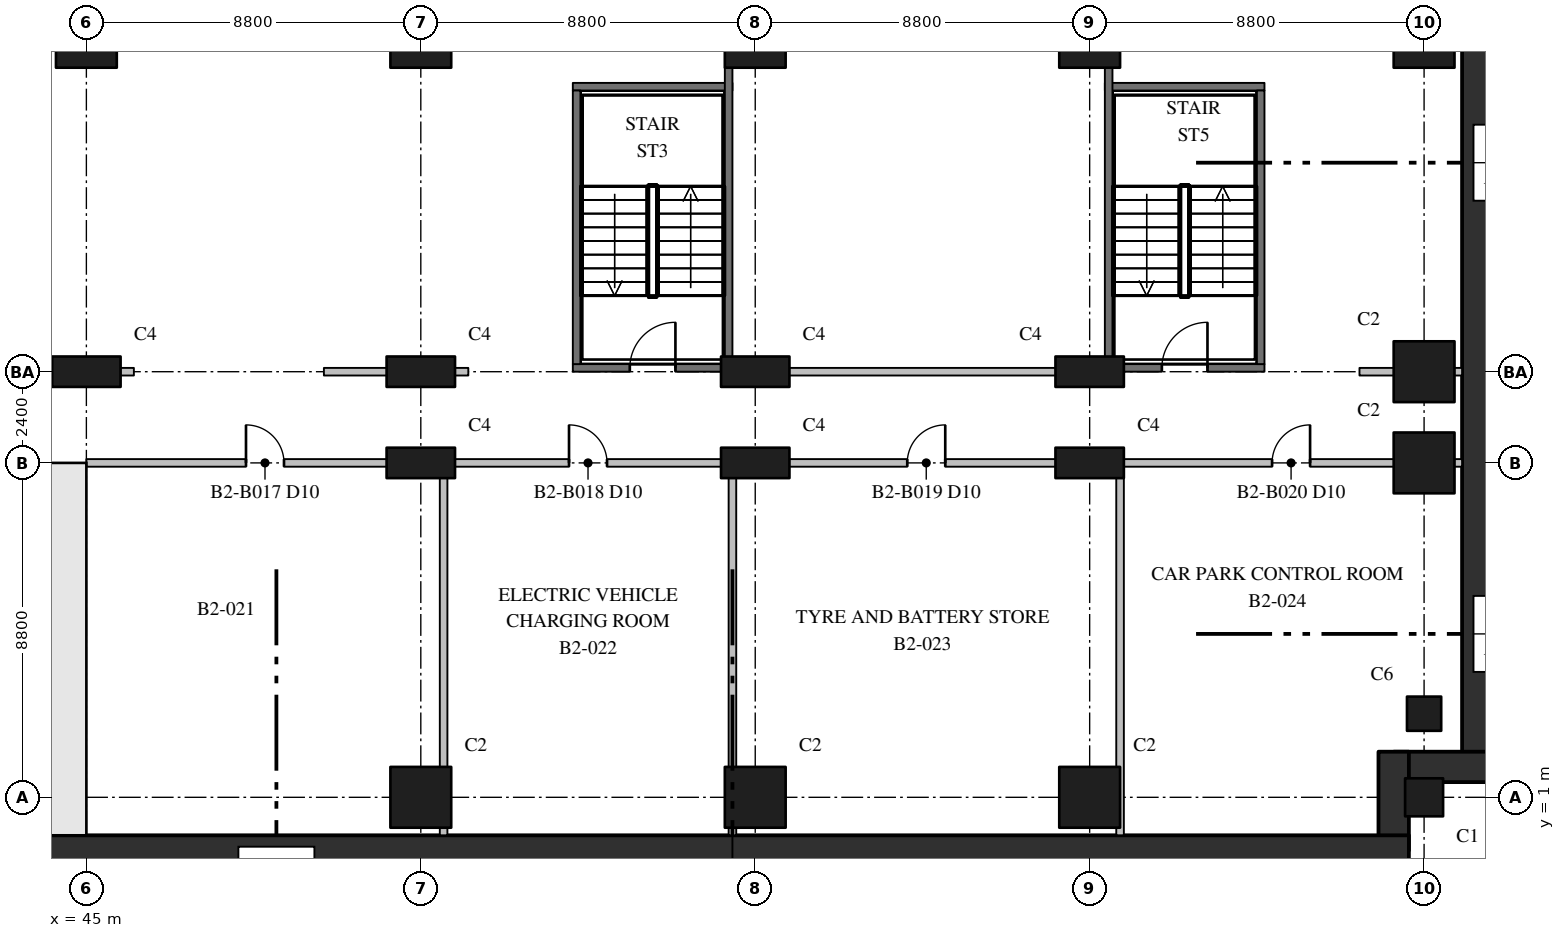
"""IFC4 building model, lengths in metres.
Left out: names, types, materials, properties, quantities, classifications, styles, units other than length and angle.
Written with IfcOpenShell. Run it as: python <this file> out.ifc"""

import sys

from ifc_helpers import new_model, si_unit, direction, frame, frame_2d, origin, origin_2d, place, context, subcontext, project, spatial, rectangle, extrude, element, fill, save


model = new_model("IFC4")
c1 = context("Model", 3, precision=1e-05, world=origin(), true_north=direction((0.0, 1.0)))
c2 = subcontext(c1, "Body", "Model", "MODEL_VIEW")
j1 = project(units=[si_unit("LENGTHUNIT", "METRE"), si_unit("PLANEANGLEUNIT", "RADIAN")], contexts=[c1])
p1 = place(None, origin())
s1 = spatial("IfcSite", under=j1, at=p1, CompositionType="ELEMENT")
p2 = place(p1, origin())
s2 = spatial("IfcBuilding", under=s1, at=p2, CompositionType="ELEMENT")
p3 = place(p2, frame((0.0, 0.0, -12.0)))
s3 = spatial("IfcBuildingStorey", under=s2, at=p3, CompositionType="ELEMENT", Elevation=-12.0)
p4 = place(p3, frame((45.0, 12.2, 0.0), z_axis=(0.0, 0.0, 1.0), x_axis=(1.0, 0.0, 0.0)))
e1 = element("IfcColumn", 1, at=p4, inside=s3, PredefinedType="COLUMN", context=c2, shape_type="SweptSolid", body=[
    extrude(rectangle(XDim=1.8, YDim=0.8, at=origin_2d()), origin(), (0.0, 0.0, 1.0), 5.0),
])
for number, where, z_axis, x_axis in (
    (2, (45.0, 21.0, 0.0), (0.0, 0.0, 1.0), (1.0, 0.0, 0.0)),
    (3, (53.8, 1.0, 0.0), (0.0, 0.0, 1.0), (1.0, 0.0, 0.0)),
):
    element("IfcColumn", number, at=place(p3, frame(where, z_axis=z_axis, x_axis=x_axis)), inside=s3, PredefinedType="COLUMN", context=c2, shape_type="SweptSolid", body=[
        extrude(rectangle(XDim=1.6, YDim=1.6, at=origin_2d()), origin(), (0.0, 0.0, 1.0), 5.0),
    ])
for number, where, z_axis, x_axis in (
    (4, (53.8, 9.8, 0.0), (0.0, 0.0, 1.0), (1.0, 0.0, 0.0)),
    (5, (53.8, 12.2, 0.0), (0.0, 0.0, 1.0), (1.0, 0.0, 0.0)),
):
    element("IfcColumn", number, at=place(p3, frame(where, z_axis=z_axis, x_axis=x_axis)), inside=s3, PredefinedType="COLUMN", context=c2, shape_type="SweptSolid", body=[
        extrude(rectangle(XDim=1.8, YDim=0.8, at=origin_2d()), origin(), (0.0, 0.0, 1.0), 5.0),
    ])
for number, where, z_axis, x_axis in (
    (6, (53.8, 21.0, 0.0), (0.0, 0.0, 1.0), (1.0, 0.0, 0.0)),
    (7, (62.6, 1.0, 0.0), (0.0, 0.0, 1.0), (1.0, 0.0, 0.0)),
):
    element("IfcColumn", number, at=place(p3, frame(where, z_axis=z_axis, x_axis=x_axis)), inside=s3, PredefinedType="COLUMN", context=c2, shape_type="SweptSolid", body=[
        extrude(rectangle(XDim=1.6, YDim=1.6, at=origin_2d()), origin(), (0.0, 0.0, 1.0), 5.0),
    ])
for number, where, z_axis, x_axis in (
    (8, (62.6, 9.8, 0.0), (0.0, 0.0, 1.0), (1.0, 0.0, 0.0)),
    (9, (62.6, 12.2, 0.0), (0.0, 0.0, 1.0), (1.0, 0.0, 0.0)),
):
    element("IfcColumn", number, at=place(p3, frame(where, z_axis=z_axis, x_axis=x_axis)), inside=s3, PredefinedType="COLUMN", context=c2, shape_type="SweptSolid", body=[
        extrude(rectangle(XDim=1.8, YDim=0.8, at=origin_2d()), origin(), (0.0, 0.0, 1.0), 5.0),
    ])
for number, where, z_axis, x_axis in (
    (10, (62.6, 21.0, 0.0), (0.0, 0.0, 1.0), (1.0, 0.0, 0.0)),
    (11, (71.4, 1.0, 0.0), (0.0, 0.0, 1.0), (1.0, 0.0, 0.0)),
):
    element("IfcColumn", number, at=place(p3, frame(where, z_axis=z_axis, x_axis=x_axis)), inside=s3, PredefinedType="COLUMN", context=c2, shape_type="SweptSolid", body=[
        extrude(rectangle(XDim=1.6, YDim=1.6, at=origin_2d()), origin(), (0.0, 0.0, 1.0), 5.0),
    ])
for number, where, z_axis, x_axis in (
    (12, (71.4, 9.8, 0.0), (0.0, 0.0, 1.0), (1.0, 0.0, 0.0)),
    (13, (71.4, 12.2, 0.0), (0.0, 0.0, 1.0), (1.0, 0.0, 0.0)),
):
    element("IfcColumn", number, at=place(p3, frame(where, z_axis=z_axis, x_axis=x_axis)), inside=s3, PredefinedType="COLUMN", context=c2, shape_type="SweptSolid", body=[
        extrude(rectangle(XDim=1.8, YDim=0.8, at=origin_2d()), origin(), (0.0, 0.0, 1.0), 5.0),
    ])
p5 = place(p3, frame((71.4, 21.0, 0.0), z_axis=(0.0, 0.0, 1.0), x_axis=(1.0, 0.0, 0.0)))
e14 = element("IfcColumn", 14, at=p5, inside=s3, PredefinedType="COLUMN", context=c2, shape_type="SweptSolid", body=[
    extrude(rectangle(XDim=1.6, YDim=1.6, at=origin_2d()), origin(), (0.0, 0.0, 1.0), 5.0),
])
p6 = place(p3, frame((80.2, 1.0, 0.0), z_axis=(0.0, 0.0, 1.0), x_axis=(1.0, 0.0, 0.0)))
e15 = element("IfcColumn", 15, at=p6, inside=s3, PredefinedType="COLUMN", context=c2, shape_type="SweptSolid", body=[
    extrude(rectangle(XDim=1.0, YDim=1.0, at=origin_2d()), origin(), (0.0, 0.0, 1.0), 5.0),
])
for number, where, z_axis, x_axis in (
    (16, (80.2, 9.8, 0.0), (0.0, 0.0, 1.0), (1.0, 0.0, 0.0)),
    (17, (80.2, 12.2, 0.0), (0.0, 0.0, 1.0), (1.0, 0.0, 0.0)),
    (18, (80.2, 21.0, 0.0), (0.0, 0.0, 1.0), (1.0, 0.0, 0.0)),
):
    element("IfcColumn", number, at=place(p3, frame(where, z_axis=z_axis, x_axis=x_axis)), inside=s3, PredefinedType="COLUMN", context=c2, shape_type="SweptSolid", body=[
        extrude(rectangle(XDim=1.6, YDim=1.6, at=origin_2d()), origin(), (0.0, 0.0, 1.0), 5.0),
    ])
p7 = place(p3, frame((80.2, 3.2, 0.0), z_axis=(0.0, 0.0, 1.0), x_axis=(1.0, 0.0, 0.0)))
e19 = element("IfcColumn", 19, at=p7, inside=s3, PredefinedType="COLUMN", context=c2, shape_type="SweptSolid", body=[
    extrude(rectangle(XDim=0.9, YDim=0.9, at=origin_2d()), origin(), (0.0, 0.0, 1.0), 5.0),
])
p8 = place(p3, frame((9.8, 0.6, 0.0), z_axis=(0.0, 0.0, 1.0), x_axis=(1.0, 0.0, 0.0)))
e20 = element("IfcWall", 20, at=p8, inside=s3, PredefinedType="SHEAR", context=c2, shape_type="SweptSolid", body=[
    extrude(rectangle(XDim=35.2, YDim=1.2, at=frame_2d((17.6, 0.0))), origin(), (0.0, 0.0, 1.0), 5.0),
])
p9 = place(p3, frame((44.4, 1.2, 0.0), z_axis=(0.0, 0.0, 1.0), x_axis=(0.0, 1.0, 0.0)))
e21 = element("IfcWall", 21, at=p9, inside=s3, PredefinedType="SHEAR", context=c2, shape_type="SweptSolid", body=[
    extrude(rectangle(XDim=8.6, YDim=1.2, at=frame_2d((4.3, 0.0))), origin(), (0.0, 0.0, 1.0), 5.0),
])
p10 = place(p3, frame((40.7, 9.6, 0.0), z_axis=(0.0, 0.0, 1.0), x_axis=(1.0, 0.0, 0.0)))
e22 = element("IfcWall", 22, at=p10, inside=s3, PredefinedType="SHEAR", context=c2, shape_type="SweptSolid", body=[
    extrude(rectangle(XDim=4.3, YDim=0.4, at=frame_2d((2.15, 0.0))), origin(), (0.0, 0.0, 1.0), 5.0),
])
p11 = place(p10, frame((1.05, 0.0, 0.0)))
e23 = element("IfcOpeningElement", 23, at=p11, cuts=e22, PredefinedType="OPENING", context=c2, shape_type="SweptSolid", body=[
    extrude(rectangle(XDim=1.2, YDim=2.1, at=frame_2d((0.6, 1.05))), frame((0.0, 0.21, 0.0), z_axis=(0.0, -1.0, 0.0), x_axis=(1.0, 0.0, 0.0)), (0.0, 0.0, 1.0), 0.42),
])
p12 = place(p3, frame((81.6, 79.8, 0.0), z_axis=(0.0, 0.0, 1.0), x_axis=(0.0, -1.0, 0.0)))
e24 = element("IfcWall", 24, at=p12, inside=s3, PredefinedType="SHEAR", context=c2, shape_type="SweptSolid", body=[
    extrude(rectangle(XDim=78.0, YDim=0.8, at=frame_2d((39.0, 0.0))), origin(), (0.0, 0.0, 1.0), 5.0),
])
p13 = place(p3, frame((82.0, 1.8, 0.0), z_axis=(0.0, 0.0, 1.0), x_axis=(-1.0, 0.0, 0.0)))
e25 = element("IfcWall", 25, at=p13, inside=s3, PredefinedType="SHEAR", context=c2, shape_type="SweptSolid", body=[
    extrude(rectangle(XDim=2.6, YDim=0.8, at=frame_2d((1.3, 0.0))), origin(), (0.0, 0.0, 1.0), 5.0),
])
p14 = place(p3, frame((79.4, 2.2, 0.0), z_axis=(0.0, 0.0, 1.0), x_axis=(0.0, -1.0, 0.0)))
e26 = element("IfcWall", 26, at=p14, inside=s3, PredefinedType="SHEAR", context=c2, shape_type="SweptSolid", body=[
    extrude(rectangle(XDim=2.6, YDim=0.8, at=frame_2d((1.3, 0.0))), origin(), (0.0, 0.0, 1.0), 5.0),
])
p15 = place(p3, frame((79.8, -0.4, 0.0), z_axis=(0.0, 0.0, 1.0), x_axis=(-1.0, 0.0, 0.0)))
e27 = element("IfcWall", 27, at=p15, inside=s3, PredefinedType="SHEAR", context=c2, shape_type="SweptSolid", body=[
    extrude(rectangle(XDim=78.0, YDim=0.8, at=frame_2d((39.0, 0.0))), origin(), (0.0, 0.0, 1.0), 5.0),
])
p16 = place(p3, frame((57.8, 12.3, 0.0), z_axis=(0.0, 0.0, 1.0), x_axis=(1.0, 0.0, 0.0)))
e28 = element("IfcWall", 28, at=p16, inside=s3, PredefinedType="SHEAR", context=c2, shape_type="SweptSolid", body=[
    extrude(rectangle(XDim=4.2, YDim=0.2, at=frame_2d((2.1, 0.0))), origin(), (0.0, 0.0, 1.0), 4.598),
])
p17 = place(p16, frame((1.5, 0.0, 0.0)))
e29 = element("IfcOpeningElement", 29, at=p17, cuts=e28, PredefinedType="OPENING", context=c2, shape_type="SweptSolid", body=[
    extrude(rectangle(XDim=1.2, YDim=2.1, at=frame_2d((0.6, 1.05))), frame((0.0, 0.11, 0.0), z_axis=(0.0, -1.0, 0.0), x_axis=(1.0, 0.0, 0.0)), (0.0, 0.0, 1.0), 0.22),
])
p18 = place(p3, frame((57.8, 19.7, 0.0), z_axis=(0.0, 0.0, 1.0), x_axis=(1.0, 0.0, 0.0)))
e30 = element("IfcWall", 30, at=p18, inside=s3, PredefinedType="SHEAR", context=c2, shape_type="SweptSolid", body=[
    extrude(rectangle(XDim=4.2, YDim=0.2, at=frame_2d((2.1, 0.0))), origin(), (0.0, 0.0, 1.0), 4.598),
])
p19 = place(p3, frame((57.9, 12.4, 0.0), z_axis=(0.0, 0.0, 1.0), x_axis=(0.0, 1.0, 0.0)))
e31 = element("IfcWall", 31, at=p19, inside=s3, PredefinedType="SHEAR", context=c2, shape_type="SweptSolid", body=[
    extrude(rectangle(XDim=7.2, YDim=0.2, at=frame_2d((3.6, 0.0))), origin(), (0.0, 0.0, 1.0), 4.598),
])
p20 = place(p3, frame((61.9, 12.4, 0.0), z_axis=(0.0, 0.0, 1.0), x_axis=(0.0, 1.0, 0.0)))
e32 = element("IfcWall", 32, at=p20, inside=s3, PredefinedType="SHEAR", context=c2, shape_type="SweptSolid", body=[
    extrude(rectangle(XDim=7.8, YDim=0.2, at=frame_2d((3.9, 0.0))), origin(), (0.0, 0.0, 1.0), 4.598),
])
p21 = place(p3, frame((71.8, 12.3, 0.0), z_axis=(0.0, 0.0, 1.0), x_axis=(1.0, 0.0, 0.0)))
e33 = element("IfcWall", 33, at=p21, inside=s3, PredefinedType="SHEAR", context=c2, shape_type="SweptSolid", body=[
    extrude(rectangle(XDim=4.2, YDim=0.2, at=frame_2d((2.1, 0.0))), origin(), (0.0, 0.0, 1.0), 4.598),
])
p22 = place(p21, frame((1.5, 0.0, 0.0)))
e34 = element("IfcOpeningElement", 34, at=p22, cuts=e33, PredefinedType="OPENING", context=c2, shape_type="SweptSolid", body=[
    extrude(rectangle(XDim=1.2, YDim=2.1, at=frame_2d((0.6, 1.05))), frame((0.0, 0.11, 0.0), z_axis=(0.0, -1.0, 0.0), x_axis=(1.0, 0.0, 0.0)), (0.0, 0.0, 1.0), 0.22),
])
p23 = place(p3, frame((71.8, 19.7, 0.0), z_axis=(0.0, 0.0, 1.0), x_axis=(1.0, 0.0, 0.0)))
e35 = element("IfcWall", 35, at=p23, inside=s3, PredefinedType="SHEAR", context=c2, shape_type="SweptSolid", body=[
    extrude(rectangle(XDim=4.2, YDim=0.2, at=frame_2d((2.1, 0.0))), origin(), (0.0, 0.0, 1.0), 4.598),
])
p24 = place(p3, frame((71.9, 12.4, 0.0), z_axis=(0.0, 0.0, 1.0), x_axis=(0.0, 1.0, 0.0)))
e36 = element("IfcWall", 36, at=p24, inside=s3, PredefinedType="SHEAR", context=c2, shape_type="SweptSolid", body=[
    extrude(rectangle(XDim=7.8, YDim=0.2, at=frame_2d((3.9, 0.0))), origin(), (0.0, 0.0, 1.0), 4.598),
])
p25 = place(p3, frame((75.9, 12.4, 0.0), z_axis=(0.0, 0.0, 1.0), x_axis=(0.0, 1.0, 0.0)))
e37 = element("IfcWall", 37, at=p25, inside=s3, PredefinedType="SHEAR", context=c2, shape_type="SweptSolid", body=[
    extrude(rectangle(XDim=7.2, YDim=0.2, at=frame_2d((3.6, 0.0))), origin(), (0.0, 0.0, 1.0), 4.598),
])
p26 = place(p3, frame((25.7, 12.2, 0.0), z_axis=(0.0, 0.0, 1.0), x_axis=(1.0, 0.0, 0.0)))
e38 = element("IfcWall", 38, at=p26, inside=s3, PredefinedType="PARTITIONING", context=c2, shape_type="SweptSolid", body=[
    extrude(rectangle(XDim=20.55, YDim=0.2, at=frame_2d((10.275, 0.0))), origin(), (0.0, 0.0, 1.0), 4.598),
])
p27 = place(p26, frame((4.312, 0.0, 0.0)))
e39 = element("IfcOpeningElement", 39, at=p27, cuts=e38, PredefinedType="OPENING", context=c2, shape_type="SweptSolid", body=[
    extrude(rectangle(XDim=1.8, YDim=2.1, at=frame_2d((0.9, 1.05))), frame((0.0, 0.11, 0.0), z_axis=(0.0, -1.0, 0.0), x_axis=(1.0, 0.0, 0.0)), (0.0, 0.0, 1.0), 0.22),
])
p28 = place(p26, frame((15.56, 0.0, 0.0)))
e40 = element("IfcOpeningElement", 40, at=p28, cuts=e38, PredefinedType="OPENING", context=c2, shape_type="SweptSolid", body=[
    extrude(rectangle(XDim=1.8, YDim=2.1, at=frame_2d((0.9, 1.05))), frame((0.0, 0.11, 0.0), z_axis=(0.0, -1.0, 0.0), x_axis=(1.0, 0.0, 0.0)), (0.0, 0.0, 1.0), 0.22),
])
p29 = place(p3, frame((51.25, 12.2, 0.0), z_axis=(0.0, 0.0, 1.0), x_axis=(1.0, 0.0, 0.0)))
e41 = element("IfcWall", 41, at=p29, inside=s3, PredefinedType="PARTITIONING", context=c2, shape_type="SweptSolid", body=[
    extrude(rectangle(XDim=3.8, YDim=0.2, at=frame_2d((1.9, 0.0))), origin(), (0.0, 0.0, 1.0), 4.598),
])
p30 = place(p3, frame((62.0, 12.2, 0.0), z_axis=(0.0, 0.0, 1.0), x_axis=(1.0, 0.0, 0.0)))
e42 = element("IfcWall", 42, at=p30, inside=s3, PredefinedType="PARTITIONING", context=c2, shape_type="SweptSolid", body=[
    extrude(rectangle(XDim=9.8, YDim=0.2, at=frame_2d((4.9, 0.0))), origin(), (0.0, 0.0, 1.0), 4.598),
])
p31 = place(p3, frame((78.5, 12.2, 0.0), z_axis=(0.0, 0.0, 1.0), x_axis=(1.0, 0.0, 0.0)))
e43 = element("IfcWall", 43, at=p31, inside=s3, PredefinedType="PARTITIONING", context=c2, shape_type="SweptSolid", body=[
    extrude(rectangle(XDim=2.7, YDim=0.2, at=frame_2d((1.35, 0.0))), origin(), (0.0, 0.0, 1.0), 4.598),
])
p32 = place(p3, frame((45.0, 9.8, 0.0), z_axis=(0.0, 0.0, 1.0), x_axis=(1.0, 0.0, 0.0)))
e44 = element("IfcWall", 44, at=p32, inside=s3, PredefinedType="PARTITIONING", context=c2, shape_type="SweptSolid", body=[
    extrude(rectangle(XDim=36.2, YDim=0.2, at=frame_2d((18.1, 0.0))), origin(), (0.0, 0.0, 1.0), 4.598),
])
p33 = place(p32, frame((4.2, 0.0, 0.0)))
e45 = element("IfcOpeningElement", 45, at=p33, cuts=e44, PredefinedType="OPENING", context=c2, shape_type="SweptSolid", body=[
    extrude(rectangle(XDim=1.0, YDim=2.1, at=frame_2d((0.5, 1.05))), frame((0.0, 0.11, 0.0), z_axis=(0.0, -1.0, 0.0), x_axis=(1.0, 0.0, 0.0)), (0.0, 0.0, 1.0), 0.22),
])
p34 = place(p32, frame((12.7, 0.0, 0.0)))
e46 = element("IfcOpeningElement", 46, at=p34, cuts=e44, PredefinedType="OPENING", context=c2, shape_type="SweptSolid", body=[
    extrude(rectangle(XDim=1.0, YDim=2.1, at=frame_2d((0.5, 1.05))), frame((0.0, 0.11, 0.0), z_axis=(0.0, -1.0, 0.0), x_axis=(1.0, 0.0, 0.0)), (0.0, 0.0, 1.0), 0.22),
])
p35 = place(p32, frame((21.6, 0.0, 0.0)))
e47 = element("IfcOpeningElement", 47, at=p35, cuts=e44, PredefinedType="OPENING", context=c2, shape_type="SweptSolid", body=[
    extrude(rectangle(XDim=1.0, YDim=2.1, at=frame_2d((0.5, 1.05))), frame((0.0, 0.11, 0.0), z_axis=(0.0, -1.0, 0.0), x_axis=(1.0, 0.0, 0.0)), (0.0, 0.0, 1.0), 0.22),
])
p36 = place(p32, frame((31.2, 0.0, 0.0)))
e48 = element("IfcOpeningElement", 48, at=p36, cuts=e44, PredefinedType="OPENING", context=c2, shape_type="SweptSolid", body=[
    extrude(rectangle(XDim=1.0, YDim=2.1, at=frame_2d((0.5, 1.05))), frame((0.0, 0.11, 0.0), z_axis=(0.0, -1.0, 0.0), x_axis=(1.0, 0.0, 0.0)), (0.0, 0.0, 1.0), 0.22),
])
for number, where, z_axis, x_axis in (
    (49, (54.4, 0.0, 0.0), (0.0, 0.0, 1.0), (0.0, 1.0, 0.0)),
    (50, (62.0, 0.0, 0.0), (0.0, 0.0, 1.0), (0.0, 1.0, 0.0)),
    (51, (72.2, 0.0, 0.0), (0.0, 0.0, 1.0), (0.0, 1.0, 0.0)),
):
    element("IfcWall", number, at=place(p3, frame(where, z_axis=z_axis, x_axis=x_axis)), inside=s3, PredefinedType="PARTITIONING", context=c2, shape_type="SweptSolid", body=[
        extrude(rectangle(XDim=9.7, YDim=0.2, at=frame_2d((4.85, 0.0))), origin(), (0.0, 0.0, 1.0), 4.598),
    ])
p37 = place(p17, origin())
e52 = element("IfcDoor", 52, at=p37, inside=s3, OperationType="SINGLE_SWING_RIGHT", PredefinedType="DOOR", context=c2, shape_type="SweptSolid", body=[
    extrude(rectangle(XDim=1.2, YDim=2.1, at=frame_2d((0.6, 1.05))), frame((0.0, 0.025, 0.0), z_axis=(0.0, -1.0, 0.0), x_axis=(1.0, 0.0, 0.0)), (0.0, 0.0, 1.0), 0.05),
])
fill(e29, e52)
p38 = place(p22, origin())
e53 = element("IfcDoor", 53, at=p38, inside=s3, OperationType="SINGLE_SWING_RIGHT", PredefinedType="DOOR", context=c2, shape_type="SweptSolid", body=[
    extrude(rectangle(XDim=1.2, YDim=2.1, at=frame_2d((0.6, 1.05))), frame((0.0, 0.025, 0.0), z_axis=(0.0, -1.0, 0.0), x_axis=(1.0, 0.0, 0.0)), (0.0, 0.0, 1.0), 0.05),
])
fill(e34, e53)
p39 = place(p33, origin())
e54 = element("IfcDoor", 54, at=p39, inside=s3, OperationType="SINGLE_SWING_LEFT", PredefinedType="DOOR", context=c2, shape_type="SweptSolid", body=[
    extrude(rectangle(XDim=1.0, YDim=2.1, at=frame_2d((0.5, 1.05))), frame((0.0, 0.025, 0.0), z_axis=(0.0, -1.0, 0.0), x_axis=(1.0, 0.0, 0.0)), (0.0, 0.0, 1.0), 0.05),
])
fill(e45, e54)
p40 = place(p34, origin())
e55 = element("IfcDoor", 55, at=p40, inside=s3, OperationType="SINGLE_SWING_LEFT", PredefinedType="DOOR", context=c2, shape_type="SweptSolid", body=[
    extrude(rectangle(XDim=1.0, YDim=2.1, at=frame_2d((0.5, 1.05))), frame((0.0, 0.025, 0.0), z_axis=(0.0, -1.0, 0.0), x_axis=(1.0, 0.0, 0.0)), (0.0, 0.0, 1.0), 0.05),
])
fill(e46, e55)
p41 = place(p35, origin())
e56 = element("IfcDoor", 56, at=p41, inside=s3, OperationType="SINGLE_SWING_RIGHT", PredefinedType="DOOR", context=c2, shape_type="SweptSolid", body=[
    extrude(rectangle(XDim=1.0, YDim=2.1, at=frame_2d((0.5, 1.05))), frame((0.0, 0.025, 0.0), z_axis=(0.0, -1.0, 0.0), x_axis=(1.0, 0.0, 0.0)), (0.0, 0.0, 1.0), 0.05),
])
fill(e47, e56)
p42 = place(p36, origin())
e57 = element("IfcDoor", 57, at=p42, inside=s3, OperationType="SINGLE_SWING_RIGHT", PredefinedType="DOOR", context=c2, shape_type="SweptSolid", body=[
    extrude(rectangle(XDim=1.0, YDim=2.1, at=frame_2d((0.5, 1.05))), frame((0.0, 0.025, 0.0), z_axis=(0.0, -1.0, 0.0), x_axis=(1.0, 0.0, 0.0)), (0.0, 0.0, 1.0), 0.05),
])
fill(e48, e57)
save(model, sys.argv[1])
